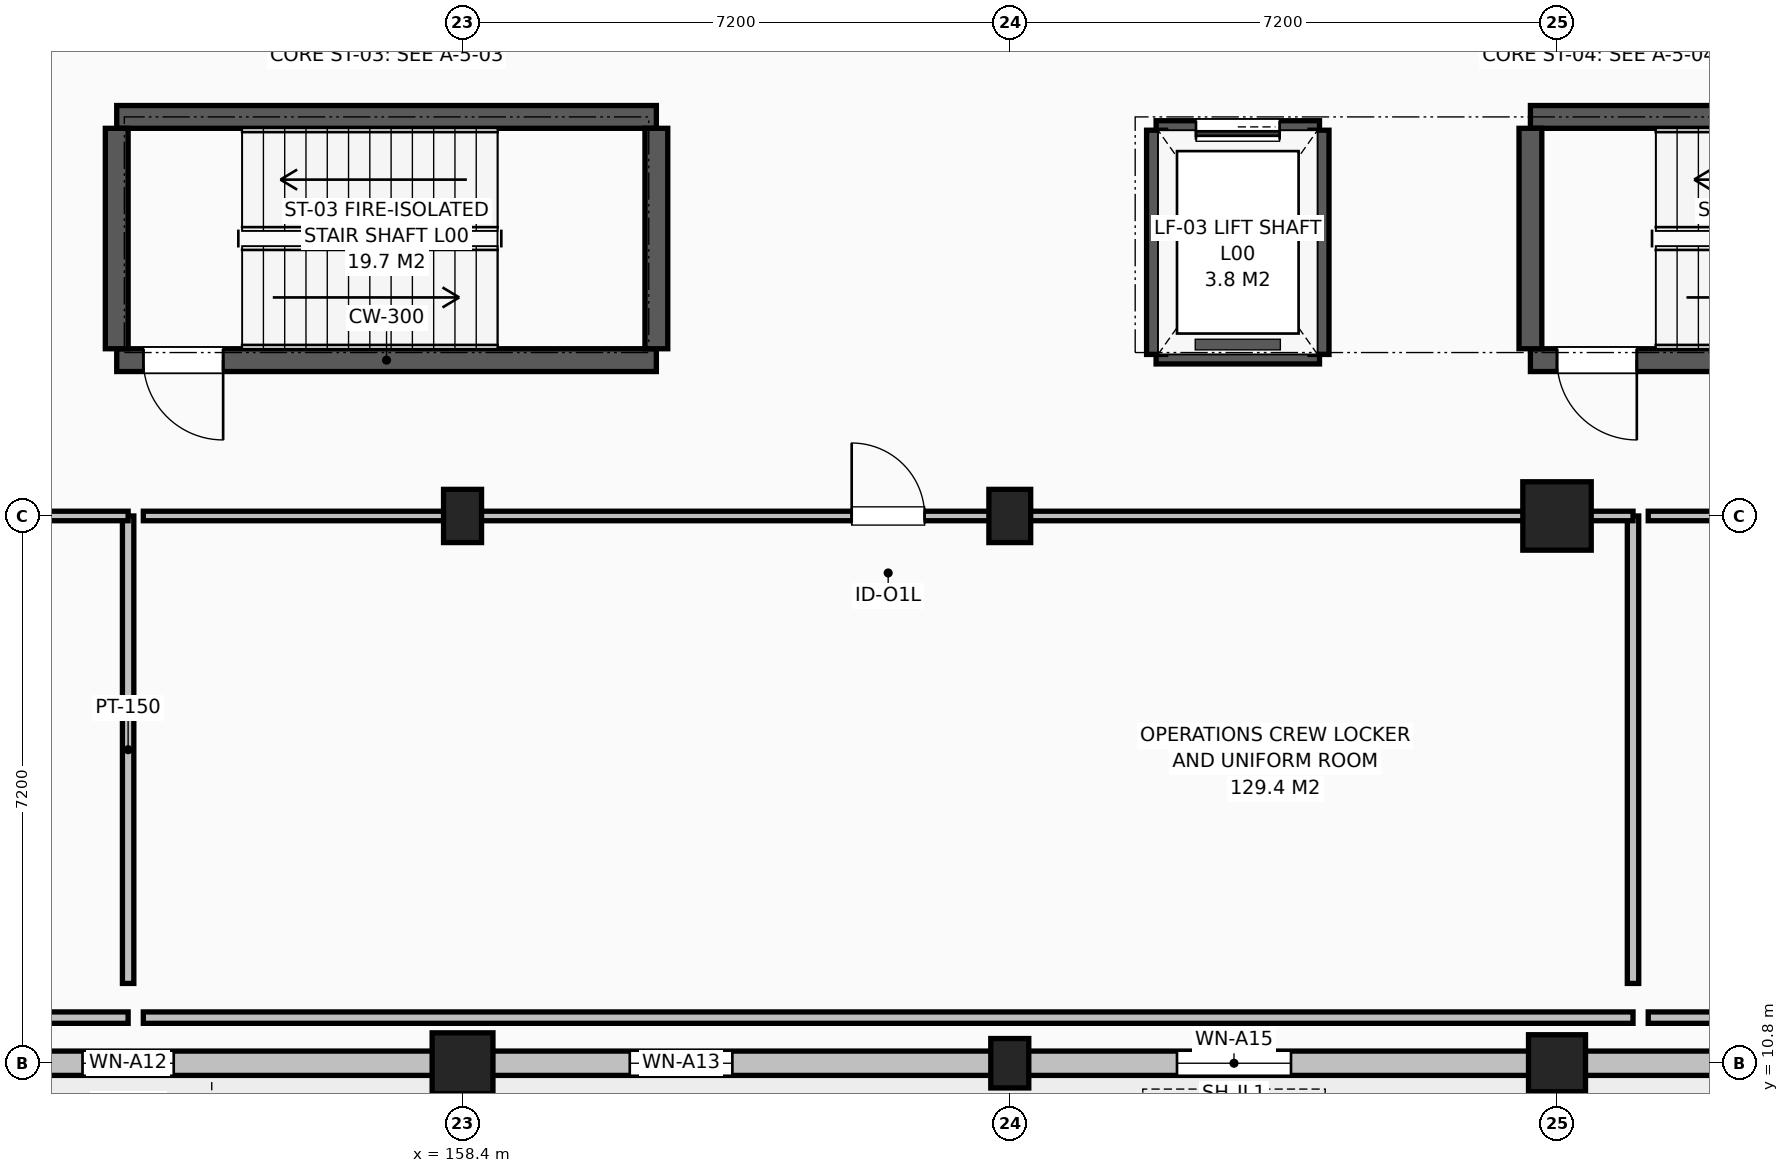
"""IFC4 building model, lengths in metres.
Left out: names, types, materials, properties, quantities, classifications, styles, units other than length and angle.
Written with IfcOpenShell. Run it as: python <this file> out.ifc"""

import sys

from ifc_helpers import new_model, si_unit, direction, frame, frame_2d, origin, origin_2d, place, context, subcontext, project, spatial, rectangle, circle, extrude, element, fill, save


model = new_model("IFC4")
c1 = context("Model", 3, precision=1e-05, world=origin(), true_north=direction((0.0, 1.0)))
c2 = subcontext(c1, "Body", "Model", "MODEL_VIEW")
j1 = project(units=[si_unit("LENGTHUNIT", "METRE"), si_unit("PLANEANGLEUNIT", "RADIAN")], contexts=[c1])
p1 = place(None, origin())
s1 = spatial("IfcSite", under=j1, at=p1, CompositionType="ELEMENT")
p2 = place(p1, origin())
s2 = spatial("IfcBuilding", under=s1, at=p2, CompositionType="ELEMENT")
p3 = place(p2, origin())
s3 = spatial("IfcBuildingStorey", under=s2, at=p3, CompositionType="ELEMENT", Elevation=0.0)
p4 = place(p3, frame((158.4, 10.8, 0.0), z_axis=(0.0, 0.0, 1.0), x_axis=(1.0, 0.0, 0.0)))
e1 = element("IfcColumn", 1, at=p4, inside=s3, PredefinedType="COLUMN", context=c2, shape_type="SweptSolid", body=[
    extrude(rectangle(XDim=0.8, YDim=0.8, at=origin_2d()), origin(), (0.0, 0.0, 1.0), 4.8),
])
p5 = place(p3, frame((158.4, 18.0, 0.0), z_axis=(0.0, 0.0, 1.0), x_axis=(1.0, 0.0, 0.0)))
e2 = element("IfcColumn", 2, at=p5, inside=s3, PredefinedType="COLUMN", context=c2, shape_type="SweptSolid", body=[
    extrude(rectangle(XDim=0.5, YDim=0.7, at=origin_2d()), origin(), (0.0, 0.0, 1.0), 4.8),
])
p6 = place(p3, frame((165.6, 10.8, 0.0), z_axis=(0.0, 0.0, 1.0), x_axis=(1.0, 0.0, 0.0)))
e3 = element("IfcColumn", 3, at=p6, inside=s3, PredefinedType="COLUMN", context=c2, shape_type="SweptSolid", body=[
    extrude(rectangle(XDim=0.5, YDim=0.65, at=origin_2d()), origin(), (0.0, 0.0, 1.0), 4.8),
])
p7 = place(p3, frame((165.6, 18.0, 0.0), z_axis=(0.0, 0.0, 1.0), x_axis=(1.0, 0.0, 0.0)))
e4 = element("IfcColumn", 4, at=p7, inside=s3, PredefinedType="COLUMN", context=c2, shape_type="SweptSolid", body=[
    extrude(rectangle(XDim=0.55, YDim=0.7, at=origin_2d()), origin(), (0.0, 0.0, 1.0), 4.8),
])
p8 = place(p3, frame((172.8, 10.8, 0.0), z_axis=(0.0, 0.0, 1.0), x_axis=(1.0, 0.0, 0.0)))
e5 = element("IfcColumn", 5, at=p8, inside=s3, PredefinedType="COLUMN", context=c2, shape_type="SweptSolid", body=[
    extrude(circle(Radius=0.375, at=origin_2d()), origin(), (0.0, 0.0, 1.0), 4.8),
])
p9 = place(p3, frame((172.8, 18.0, 0.0), z_axis=(0.0, 0.0, 1.0), x_axis=(1.0, 0.0, 0.0)))
e6 = element("IfcColumn", 6, at=p9, inside=s3, PredefinedType="COLUMN", context=c2, shape_type="SweptSolid", body=[
    extrude(circle(Radius=0.45, at=origin_2d()), origin(), (0.0, 0.0, 1.0), 4.8),
])
p10 = place(p3, frame((108.0, 10.8, 0.0), z_axis=(0.0, 0.0, 1.0), x_axis=(1.0, 0.0, 0.0)))
e7 = element("IfcWall", 7, at=p10, inside=s3, PredefinedType="SOLIDWALL", context=c2, shape_type="SweptSolid", body=[
    extrude(rectangle(XDim=79.2, YDim=0.32, at=frame_2d((39.6, 0.0))), origin(), (0.0, 0.0, 1.0), 4.25),
])
p11 = place(p10, frame((2.2, 0.0, 0.72)))
e8 = element("IfcOpeningElement", 8, at=p11, cuts=e7, PredefinedType="OPENING", context=c2, shape_type="SweptSolid", body=[
    extrude(rectangle(XDim=1.8, YDim=2.15, at=frame_2d((0.9, 1.075))), frame((0.0, 0.17, 0.0), z_axis=(0.0, -1.0, 0.0), x_axis=(1.0, 0.0, 0.0)), (0.0, 0.0, 1.0), 0.34),
])
p12 = place(p10, frame((9.4, 0.0, 0.72)))
e9 = element("IfcOpeningElement", 9, at=p12, cuts=e7, PredefinedType="OPENING", context=c2, shape_type="SweptSolid", body=[
    extrude(rectangle(XDim=1.2, YDim=2.0, at=frame_2d((0.6, 1.0))), frame((0.0, 0.17, 0.0), z_axis=(0.0, -1.0, 0.0), x_axis=(1.0, 0.0, 0.0)), (0.0, 0.0, 1.0), 0.34),
])
p13 = place(p10, frame((16.6, 0.0, 0.72)))
e10 = element("IfcOpeningElement", 10, at=p13, cuts=e7, PredefinedType="OPENING", context=c2, shape_type="SweptSolid", body=[
    extrude(rectangle(XDim=1.35, YDim=2.05, at=frame_2d((0.675, 1.025))), frame((0.0, 0.17, 0.0), z_axis=(0.0, -1.0, 0.0), x_axis=(1.0, 0.0, 0.0)), (0.0, 0.0, 1.0), 0.34),
])
p14 = place(p10, frame((23.8, 0.0, 0.72)))
e11 = element("IfcOpeningElement", 11, at=p14, cuts=e7, PredefinedType="OPENING", context=c2, shape_type="SweptSolid", body=[
    extrude(rectangle(XDim=1.5, YDim=2.1, at=frame_2d((0.75, 1.05))), frame((0.0, 0.17, 0.0), z_axis=(0.0, -1.0, 0.0), x_axis=(1.0, 0.0, 0.0)), (0.0, 0.0, 1.0), 0.34),
])
p15 = place(p10, frame((31.0, 0.0, 0.72)))
e12 = element("IfcOpeningElement", 12, at=p15, cuts=e7, PredefinedType="OPENING", context=c2, shape_type="SweptSolid", body=[
    extrude(rectangle(XDim=1.65, YDim=2.1, at=frame_2d((0.825, 1.05))), frame((0.0, 0.17, 0.0), z_axis=(0.0, -1.0, 0.0), x_axis=(1.0, 0.0, 0.0)), (0.0, 0.0, 1.0), 0.34),
])
p16 = place(p10, frame((38.2, 0.0, 0.72)))
e13 = element("IfcOpeningElement", 13, at=p16, cuts=e7, PredefinedType="OPENING", context=c2, shape_type="SweptSolid", body=[
    extrude(rectangle(XDim=1.8, YDim=2.15, at=frame_2d((0.9, 1.075))), frame((0.0, 0.17, 0.0), z_axis=(0.0, -1.0, 0.0), x_axis=(1.0, 0.0, 0.0)), (0.0, 0.0, 1.0), 0.34),
])
p17 = place(p10, frame((45.4, 0.0, 0.72)))
e14 = element("IfcOpeningElement", 14, at=p17, cuts=e7, PredefinedType="OPENING", context=c2, shape_type="SweptSolid", body=[
    extrude(rectangle(XDim=1.2, YDim=2.0, at=frame_2d((0.6, 1.0))), frame((0.0, 0.17, 0.0), z_axis=(0.0, -1.0, 0.0), x_axis=(1.0, 0.0, 0.0)), (0.0, 0.0, 1.0), 0.34),
])
p18 = place(p10, frame((52.6, 0.0, 0.72)))
e15 = element("IfcOpeningElement", 15, at=p18, cuts=e7, PredefinedType="OPENING", context=c2, shape_type="SweptSolid", body=[
    extrude(rectangle(XDim=1.35, YDim=2.05, at=frame_2d((0.675, 1.025))), frame((0.0, 0.17, 0.0), z_axis=(0.0, -1.0, 0.0), x_axis=(1.0, 0.0, 0.0)), (0.0, 0.0, 1.0), 0.34),
])
p19 = place(p10, frame((59.8, 0.0, 0.72)))
e16 = element("IfcOpeningElement", 16, at=p19, cuts=e7, PredefinedType="OPENING", context=c2, shape_type="SweptSolid", body=[
    extrude(rectangle(XDim=1.5, YDim=2.1, at=frame_2d((0.75, 1.05))), frame((0.0, 0.17, 0.0), z_axis=(0.0, -1.0, 0.0), x_axis=(1.0, 0.0, 0.0)), (0.0, 0.0, 1.0), 0.34),
])
p20 = place(p10, frame((67.0, 0.0, 0.72)))
e17 = element("IfcOpeningElement", 17, at=p20, cuts=e7, PredefinedType="OPENING", context=c2, shape_type="SweptSolid", body=[
    extrude(rectangle(XDim=1.65, YDim=2.1, at=frame_2d((0.825, 1.05))), frame((0.0, 0.17, 0.0), z_axis=(0.0, -1.0, 0.0), x_axis=(1.0, 0.0, 0.0)), (0.0, 0.0, 1.0), 0.34),
])
p21 = place(p3, frame((153.85, 20.05, 0.0), z_axis=(0.0, 0.0, 1.0), x_axis=(1.0, 0.0, 0.0)))
e18 = element("IfcWall", 18, at=p21, inside=s3, PredefinedType="SHEAR", context=c2, shape_type="SweptSolid", body=[
    extrude(rectangle(XDim=7.1, YDim=0.3, at=frame_2d((3.55, 0.0))), origin(), (0.0, 0.0, 1.0), 4.525),
])
p22 = place(p21, frame((0.35, 0.0, 0.0)))
e19 = element("IfcOpeningElement", 19, at=p22, cuts=e18, PredefinedType="OPENING", context=c2, shape_type="SweptSolid", body=[
    extrude(rectangle(XDim=1.05, YDim=2.15, at=frame_2d((0.525, 1.075))), frame((0.0, 0.16, 0.0), z_axis=(0.0, -1.0, 0.0), x_axis=(1.0, 0.0, 0.0)), (0.0, 0.0, 1.0), 0.32),
])
p23 = place(p3, frame((160.95, 23.25, 0.0), z_axis=(0.0, 0.0, 1.0), x_axis=(-1.0, 0.0, 0.0)))
e20 = element("IfcWall", 20, at=p23, inside=s3, PredefinedType="SHEAR", context=c2, shape_type="SweptSolid", body=[
    extrude(rectangle(XDim=7.1, YDim=0.3, at=frame_2d((3.55, 0.0))), origin(), (0.0, 0.0, 1.0), 4.525),
])
for number, where, z_axis, x_axis in (
    (21, (160.95, 20.2, 0.0), (0.0, 0.0, 1.0), (0.0, 1.0, 0.0)),
    (22, (153.85, 23.1, 0.0), (0.0, 0.0, 1.0), (0.0, -1.0, 0.0)),
):
    element("IfcWall", number, at=place(p3, frame(where, z_axis=z_axis, x_axis=x_axis)), inside=s3, PredefinedType="SHEAR", context=c2, shape_type="SweptSolid", body=[
        extrude(rectangle(XDim=2.9, YDim=0.3, at=frame_2d((1.45, 0.0))), origin(), (0.0, 0.0, 1.0), 4.525),
    ])
p24 = place(p3, frame((172.45, 20.05, 0.0), z_axis=(0.0, 0.0, 1.0), x_axis=(1.0, 0.0, 0.0)))
e23 = element("IfcWall", 23, at=p24, inside=s3, PredefinedType="SHEAR", context=c2, shape_type="SweptSolid", body=[
    extrude(rectangle(XDim=7.1, YDim=0.3, at=frame_2d((3.55, 0.0))), origin(), (0.0, 0.0, 1.0), 4.525),
])
p25 = place(p24, frame((0.35, 0.0, 0.0)))
e24 = element("IfcOpeningElement", 24, at=p25, cuts=e23, PredefinedType="OPENING", context=c2, shape_type="SweptSolid", body=[
    extrude(rectangle(XDim=1.05, YDim=2.15, at=frame_2d((0.525, 1.075))), frame((0.0, 0.16, 0.0), z_axis=(0.0, -1.0, 0.0), x_axis=(1.0, 0.0, 0.0)), (0.0, 0.0, 1.0), 0.32),
])
p26 = place(p3, frame((179.55, 23.25, 0.0), z_axis=(0.0, 0.0, 1.0), x_axis=(-1.0, 0.0, 0.0)))
e25 = element("IfcWall", 25, at=p26, inside=s3, PredefinedType="SHEAR", context=c2, shape_type="SweptSolid", body=[
    extrude(rectangle(XDim=7.1, YDim=0.3, at=frame_2d((3.55, 0.0))), origin(), (0.0, 0.0, 1.0), 4.525),
])
p27 = place(p3, frame((172.45, 23.1, 0.0), z_axis=(0.0, 0.0, 1.0), x_axis=(0.0, -1.0, 0.0)))
e26 = element("IfcWall", 26, at=p27, inside=s3, PredefinedType="SHEAR", context=c2, shape_type="SweptSolid", body=[
    extrude(rectangle(XDim=2.9, YDim=0.3, at=frame_2d((1.45, 0.0))), origin(), (0.0, 0.0, 1.0), 4.525),
])
p28 = place(p3, frame((167.525, 20.125, 0.0), z_axis=(0.0, 0.0, 1.0), x_axis=(1.0, 0.0, 0.0)))
e27 = element("IfcWall", 27, at=p28, inside=s3, PredefinedType="SHEAR", context=c2, shape_type="SweptSolid", body=[
    extrude(rectangle(XDim=2.15, YDim=0.25, at=frame_2d((1.075, 0.0))), origin(), (0.0, 0.0, 1.0), 4.5),
])
p29 = place(p3, frame((169.675, 23.075, 0.0), z_axis=(0.0, 0.0, 1.0), x_axis=(-1.0, 0.0, 0.0)))
e28 = element("IfcWall", 28, at=p29, inside=s3, PredefinedType="SHEAR", context=c2, shape_type="SweptSolid", body=[
    extrude(rectangle(XDim=2.15, YDim=0.25, at=frame_2d((1.075, 0.0))), origin(), (0.0, 0.0, 1.0), 4.5),
])
p30 = place(p29, frame((0.525, 0.0, 0.0)))
e29 = element("IfcOpeningElement", 29, at=p30, cuts=e28, PredefinedType="OPENING", context=c2, shape_type="SweptSolid", body=[
    extrude(rectangle(XDim=1.1, YDim=2.15, at=frame_2d((0.55, 1.075))), frame((0.0, 0.135, 0.0), z_axis=(0.0, -1.0, 0.0), x_axis=(1.0, 0.0, 0.0)), (0.0, 0.0, 1.0), 0.27),
])
for number, where, z_axis, x_axis in (
    (30, (167.525, 23.075, 0.0), (0.0, 0.0, 1.0), (0.0, -1.0, 0.0)),
    (31, (169.675, 20.125, 0.0), (0.0, 0.0, 1.0), (0.0, 1.0, 0.0)),
):
    element("IfcWall", number, at=place(p3, frame(where, z_axis=z_axis, x_axis=x_axis)), inside=s3, PredefinedType="SHEAR", context=c2, shape_type="SweptSolid", body=[
        extrude(rectangle(XDim=2.95, YDim=0.25, at=frame_2d((1.475, 0.0))), origin(), (0.0, 0.0, 1.0), 4.5),
    ])
p31 = place(p3, frame((154.0, 11.4, 0.0), z_axis=(0.0, 0.0, 1.0), x_axis=(-1.0, 0.0, 0.0)))
e32 = element("IfcWall", 32, at=p31, inside=s3, PredefinedType="PARTITIONING", context=c2, shape_type="SweptSolid", body=[
    extrude(rectangle(XDim=19.0, YDim=0.15, at=frame_2d((9.5, 0.0))), origin(), (0.0, 0.0, 1.0), 3.857),
])
p32 = place(p3, frame((154.0, 11.85, 0.0), z_axis=(0.0, 0.0, 1.0), x_axis=(0.0, 1.0, 0.0)))
e33 = element("IfcWall", 33, at=p32, inside=s3, PredefinedType="PARTITIONING", context=c2, shape_type="SweptSolid", body=[
    extrude(rectangle(XDim=6.15, YDim=0.15, at=frame_2d((3.075, 0.0))), origin(), (0.0, 0.0, 1.0), 3.657),
])
p33 = place(p3, frame((135.0, 18.0, 0.0), z_axis=(0.0, 0.0, 1.0), x_axis=(1.0, 0.0, 0.0)))
e34 = element("IfcWall", 34, at=p33, inside=s3, PredefinedType="PARTITIONING", context=c2, shape_type="SweptSolid", body=[
    extrude(rectangle(XDim=19.0, YDim=0.125, at=frame_2d((9.5, 0.0))), origin(), (0.0, 0.0, 1.0), 3.657),
])
p34 = place(p33, frame((5.16, 0.0, 0.0)))
e35 = element("IfcOpeningElement", 35, at=p34, cuts=e34, PredefinedType="OPENING", context=c2, shape_type="SweptSolid", body=[
    extrude(rectangle(XDim=1.8, YDim=2.2, at=frame_2d((0.9, 1.1))), frame((0.0, 0.073, 0.0), z_axis=(0.0, -1.0, 0.0), x_axis=(1.0, 0.0, 0.0)), (0.0, 0.0, 1.0), 0.145),
])
p35 = place(p3, frame((173.8, 11.4, 0.0), z_axis=(0.0, 0.0, 1.0), x_axis=(-1.0, 0.0, 0.0)))
e36 = element("IfcWall", 36, at=p35, inside=s3, PredefinedType="PARTITIONING", context=c2, shape_type="SweptSolid", body=[
    extrude(rectangle(XDim=19.6, YDim=0.15, at=frame_2d((9.8, 0.0))), origin(), (0.0, 0.0, 1.0), 3.557),
])
p36 = place(p3, frame((173.8, 11.85, 0.0), z_axis=(0.0, 0.0, 1.0), x_axis=(0.0, 1.0, 0.0)))
e37 = element("IfcWall", 37, at=p36, inside=s3, PredefinedType="PARTITIONING", context=c2, shape_type="SweptSolid", body=[
    extrude(rectangle(XDim=6.15, YDim=0.15, at=frame_2d((3.075, 0.0))), origin(), (0.0, 0.0, 1.0), 3.507),
])
p37 = place(p3, frame((154.2, 18.0, 0.0), z_axis=(0.0, 0.0, 1.0), x_axis=(1.0, 0.0, 0.0)))
e38 = element("IfcWall", 38, at=p37, inside=s3, PredefinedType="PARTITIONING", context=c2, shape_type="SweptSolid", body=[
    extrude(rectangle(XDim=19.6, YDim=0.125, at=frame_2d((9.8, 0.0))), origin(), (0.0, 0.0, 1.0), 3.507),
])
p38 = place(p37, frame((9.32, 0.0, 0.0)))
e39 = element("IfcOpeningElement", 39, at=p38, cuts=e38, PredefinedType="OPENING", context=c2, shape_type="SweptSolid", body=[
    extrude(rectangle(XDim=0.96, YDim=2.15, at=frame_2d((0.48, 1.075))), frame((0.0, 0.073, 0.0), z_axis=(0.0, -1.0, 0.0), x_axis=(1.0, 0.0, 0.0)), (0.0, 0.0, 1.0), 0.145),
])
p39 = place(p3, frame((186.2, 11.4, 0.0), z_axis=(0.0, 0.0, 1.0), x_axis=(-1.0, 0.0, 0.0)))
e40 = element("IfcWall", 40, at=p39, inside=s3, PredefinedType="PARTITIONING", context=c2, shape_type="SweptSolid", body=[
    extrude(rectangle(XDim=12.2, YDim=0.15, at=frame_2d((6.1, 0.0))), origin(), (0.0, 0.0, 1.0), 3.657),
])
p40 = place(p3, frame((174.0, 18.0, 0.0), z_axis=(0.0, 0.0, 1.0), x_axis=(1.0, 0.0, 0.0)))
e41 = element("IfcWall", 41, at=p40, inside=s3, PredefinedType="PARTITIONING", context=c2, shape_type="SweptSolid", body=[
    extrude(rectangle(XDim=12.2, YDim=0.125, at=frame_2d((6.1, 0.0))), origin(), (0.0, 0.0, 1.0), 3.507),
])
p41 = place(p40, frame((3.369, 0.0, 0.0)))
e42 = element("IfcOpeningElement", 42, at=p41, cuts=e41, PredefinedType="OPENING", context=c2, shape_type="SweptSolid", body=[
    extrude(rectangle(XDim=0.97, YDim=2.15, at=frame_2d((0.485, 1.075))), frame((0.0, 0.073, 0.0), z_axis=(0.0, -1.0, 0.0), x_axis=(1.0, 0.0, 0.0)), (0.0, 0.0, 1.0), 0.145),
])
p42 = place(p17, origin())
e43 = element("IfcWindow", 43, at=p42, inside=s3, PartitioningType="SINGLE_PANEL", PredefinedType="WINDOW", context=c2, shape_type="SweptSolid", body=[
    extrude(rectangle(XDim=1.2, YDim=2.0, at=frame_2d((0.6, 1.0))), frame((0.0, 0.03, 0.0), z_axis=(0.0, -1.0, 0.0), x_axis=(1.0, 0.0, 0.0)), (0.0, 0.0, 1.0), 0.06),
])
fill(e14, e43)
p43 = place(p18, origin())
e44 = element("IfcWindow", 44, at=p43, inside=s3, PartitioningType="SINGLE_PANEL", PredefinedType="WINDOW", context=c2, shape_type="SweptSolid", body=[
    extrude(rectangle(XDim=1.35, YDim=2.05, at=frame_2d((0.675, 1.025))), frame((0.0, 0.03, 0.0), z_axis=(0.0, -1.0, 0.0), x_axis=(1.0, 0.0, 0.0)), (0.0, 0.0, 1.0), 0.06),
])
fill(e15, e44)
p44 = place(p19, origin())
e45 = element("IfcWindow", 45, at=p44, inside=s3, PartitioningType="SINGLE_PANEL", PredefinedType="WINDOW", context=c2, shape_type="SweptSolid", body=[
    extrude(rectangle(XDim=1.5, YDim=2.1, at=frame_2d((0.75, 1.05))), frame((0.0, 0.03, 0.0), z_axis=(0.0, -1.0, 0.0), x_axis=(1.0, 0.0, 0.0)), (0.0, 0.0, 1.0), 0.06),
])
fill(e16, e45)
p45 = place(p22, frame((1.05, 0.0, 0.0), z_axis=(0.0, 0.0, 1.0), x_axis=(-1.0, 0.0, 0.0)))
e46 = element("IfcDoor", 46, at=p45, inside=s3, OperationType="SINGLE_SWING_LEFT", PredefinedType="DOOR", context=c2, shape_type="SweptSolid", body=[
    extrude(rectangle(XDim=1.05, YDim=2.15, at=frame_2d((0.525, 1.075))), frame((0.0, 0.025, 0.0), z_axis=(0.0, -1.0, 0.0), x_axis=(1.0, 0.0, 0.0)), (0.0, 0.0, 1.0), 0.05),
])
fill(e19, e46)
p46 = place(p25, frame((1.05, 0.0, 0.0), z_axis=(0.0, 0.0, 1.0), x_axis=(-1.0, 0.0, 0.0)))
e47 = element("IfcDoor", 47, at=p46, inside=s3, OperationType="SINGLE_SWING_LEFT", PredefinedType="DOOR", context=c2, shape_type="SweptSolid", body=[
    extrude(rectangle(XDim=1.05, YDim=2.15, at=frame_2d((0.525, 1.075))), frame((0.0, 0.025, 0.0), z_axis=(0.0, -1.0, 0.0), x_axis=(1.0, 0.0, 0.0)), (0.0, 0.0, 1.0), 0.05),
])
fill(e24, e47)
p47 = place(p30, origin())
e48 = element("IfcDoor", 48, at=p47, inside=s3, OperationType="SLIDING_TO_LEFT", PredefinedType="DOOR", context=c2, shape_type="SweptSolid", body=[
    extrude(rectangle(XDim=1.1, YDim=2.15, at=frame_2d((0.55, 1.075))), frame((0.0, 0.025, 0.0), z_axis=(0.0, -1.0, 0.0), x_axis=(1.0, 0.0, 0.0)), (0.0, 0.0, 1.0), 0.05),
])
fill(e29, e48)
p48 = place(p38, origin())
e49 = element("IfcDoor", 49, at=p48, inside=s3, OperationType="SINGLE_SWING_LEFT", PredefinedType="DOOR", context=c2, shape_type="SweptSolid", body=[
    extrude(rectangle(XDim=0.96, YDim=2.15, at=frame_2d((0.48, 1.075))), frame((0.0, 0.025, 0.0), z_axis=(0.0, -1.0, 0.0), x_axis=(1.0, 0.0, 0.0)), (0.0, 0.0, 1.0), 0.05),
])
fill(e39, e49)
save(model, sys.argv[1])
